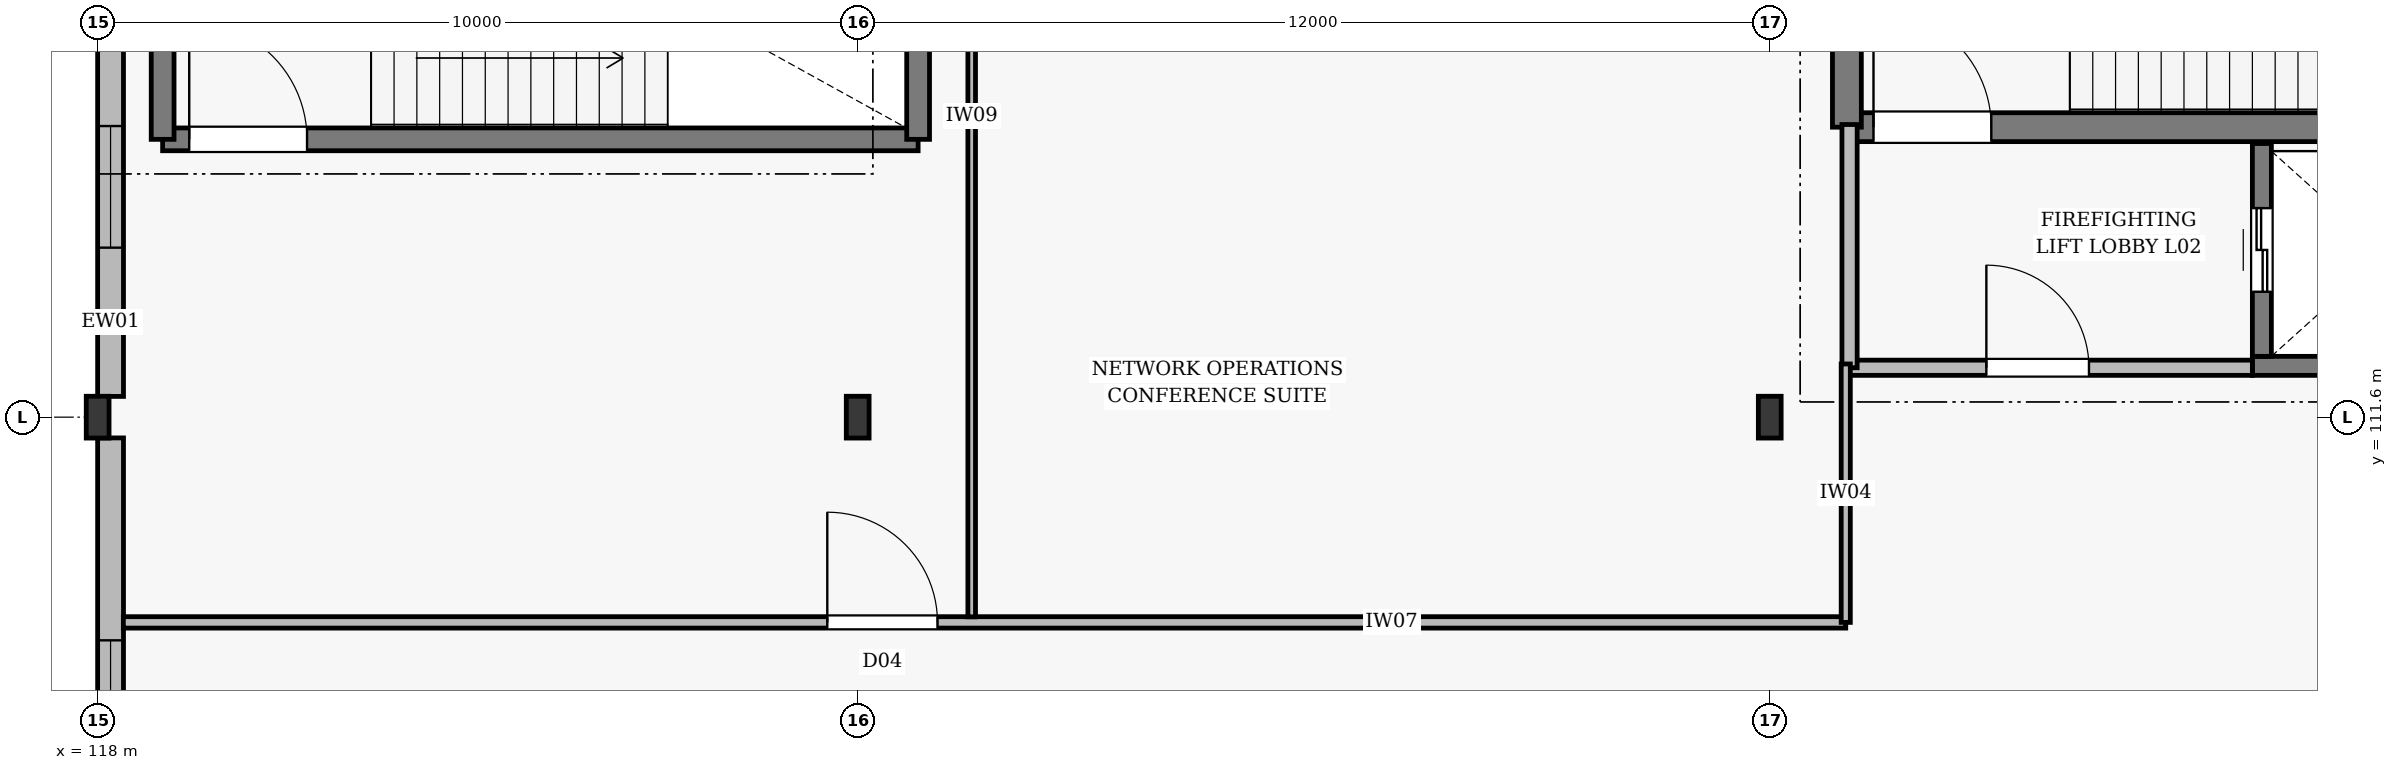
"""IFC4 building model, lengths in metres.
Left out: names, types, materials, properties, quantities, classifications, styles, units other than length and angle.
Written with IfcOpenShell. Run it as: python <this file> out.ifc"""

import sys

from ifc_helpers import new_model, si_unit, direction, frame, frame_2d, origin, origin_2d, place, context, subcontext, project, spatial, rectangle, i_section, extrude, element, fill, save


model = new_model("IFC4")
c1 = context("Model", 3, precision=1e-05, world=origin(), true_north=direction((0.0, 1.0)))
c2 = subcontext(c1, "Body", "Model", "MODEL_VIEW")
j1 = project(units=[si_unit("LENGTHUNIT", "METRE"), si_unit("PLANEANGLEUNIT", "RADIAN")], contexts=[c1])
p1 = place(None, origin())
s1 = spatial("IfcSite", under=j1, at=p1, CompositionType="ELEMENT")
p2 = place(p1, origin())
s2 = spatial("IfcBuilding", under=s1, at=p2, CompositionType="ELEMENT")
p3 = place(p2, frame((0.0, 0.0, 12.6)))
s3 = spatial("IfcBuildingStorey", under=s2, at=p3, CompositionType="ELEMENT", Elevation=12.6)
for number, where, z_axis, x_axis in (
    (1, (118.0, 111.6, 0.0), (0.0, 0.0, 1.0), (1.0, 0.0, 0.0)),
    (2, (128.0, 111.6, 0.0), (0.0, 0.0, 1.0), (1.0, 0.0, 0.0)),
    (3, (140.0, 111.6, 0.0), (0.0, 0.0, 1.0), (1.0, 0.0, 0.0)),
):
    element("IfcColumn", number, at=place(p3, frame(where, z_axis=z_axis, x_axis=x_axis)), inside=s3, PredefinedType="COLUMN", context=c2, shape_type="SweptSolid", body=[
        extrude(i_section(OverallWidth=0.3, OverallDepth=0.55, WebThickness=0.015, FlangeThickness=0.029, at=origin_2d()), origin(), (0.0, 0.0, 1.0), 4.8),
    ])
p4 = place(p3, frame((118.17, 101.073, 0.0), z_axis=(0.0, 0.0, 1.0), x_axis=(0.0, 1.0, 0.0)))
e4 = element("IfcWall", 4, at=p4, inside=s3, PredefinedType="STANDARD", context=c2, shape_type="SweptSolid", body=[
    extrude(rectangle(XDim=10.254, YDim=0.34, at=frame_2d((5.127, 0.0))), origin(), (0.0, 0.0, 1.0), 3.9),
])
p5 = place(p4, frame((0.964, 0.0, 0.75)))
e5 = element("IfcOpeningElement", 5, at=p5, cuts=e4, PredefinedType="OPENING", context=c2, shape_type="SweptSolid", body=[
    extrude(rectangle(XDim=1.2, YDim=1.8, at=frame_2d((0.6, 0.9))), frame((0.0, 0.182, 0.0), z_axis=(0.0, -1.0, 0.0), x_axis=(1.0, 0.0, 0.0)), (0.0, 0.0, 1.0), 0.364),
])
p6 = place(p4, frame((4.991, 0.0, 0.75)))
e6 = element("IfcOpeningElement", 6, at=p6, cuts=e4, PredefinedType="OPENING", context=c2, shape_type="SweptSolid", body=[
    extrude(rectangle(XDim=2.6, YDim=2.4, at=frame_2d((1.3, 1.2))), frame((0.0, 0.182, 0.0), z_axis=(0.0, -1.0, 0.0), x_axis=(1.0, 0.0, 0.0)), (0.0, 0.0, 1.0), 0.364),
])
p7 = place(p3, frame((118.17, 111.873, 0.0), z_axis=(0.0, 0.0, 1.0), x_axis=(0.0, 1.0, 0.0)))
e7 = element("IfcWall", 7, at=p7, inside=s3, PredefinedType="STANDARD", context=c2, shape_type="SweptSolid", body=[
    extrude(rectangle(XDim=10.229, YDim=0.34, at=frame_2d((5.115, 0.0))), origin(), (0.0, 0.0, 1.0), 3.9),
])
p8 = place(p7, frame((1.957, 0.0, 0.75)))
e8 = element("IfcOpeningElement", 8, at=p8, cuts=e7, PredefinedType="OPENING", context=c2, shape_type="SweptSolid", body=[
    extrude(rectangle(XDim=1.6, YDim=2.1, at=frame_2d((0.8, 1.05))), frame((0.0, 0.182, 0.0), z_axis=(0.0, -1.0, 0.0), x_axis=(1.0, 0.0, 0.0)), (0.0, 0.0, 1.0), 0.364),
])
p9 = place(p7, frame((6.672, 0.0, 0.75)))
e9 = element("IfcOpeningElement", 9, at=p9, cuts=e7, PredefinedType="OPENING", context=c2, shape_type="SweptSolid", body=[
    extrude(rectangle(XDim=1.6, YDim=2.1, at=frame_2d((0.8, 1.05))), frame((0.0, 0.182, 0.0), z_axis=(0.0, -1.0, 0.0), x_axis=(1.0, 0.0, 0.0)), (0.0, 0.0, 1.0), 0.364),
])
p10 = place(p3, frame((141.015, 115.415, 0.0), z_axis=(0.0, 0.0, 1.0), x_axis=(1.0, 0.0, 0.0)))
e10 = element("IfcWall", 10, at=p10, inside=s3, PredefinedType="SOLIDWALL", context=c2, shape_type="SweptSolid", body=[
    extrude(rectangle(XDim=10.17, YDim=0.38, at=frame_2d((5.085, 0.0))), origin(), (0.0, 0.0, 1.0), 4.8),
])
p11 = place(p10, frame((0.35, 0.0, 0.005)))
e11 = element("IfcOpeningElement", 11, at=p11, cuts=e10, PredefinedType="OPENING", context=c2, shape_type="SweptSolid", body=[
    extrude(rectangle(XDim=1.55, YDim=2.2, at=frame_2d((0.775, 1.1))), frame((0.0, 0.202, 0.0), z_axis=(0.0, -1.0, 0.0), x_axis=(1.0, 0.0, 0.0)), (0.0, 0.0, 1.0), 0.404),
])
p12 = place(p3, frame((141.015, 115.415, 0.0), z_axis=(0.0, 0.0, 1.0), x_axis=(0.0, 1.0, 0.0)))
e12 = element("IfcWall", 12, at=p12, inside=s3, PredefinedType="SOLIDWALL", context=c2, shape_type="SweptSolid", body=[
    extrude(rectangle(XDim=4.47, YDim=0.38, at=frame_2d((2.235, 0.0))), origin(), (0.0, 0.0, 1.0), 4.8),
])
p13 = place(p3, frame((118.855, 115.255, 0.0), z_axis=(0.0, 0.0, 1.0), x_axis=(1.0, 0.0, 0.0)))
e13 = element("IfcWall", 13, at=p13, inside=s3, PredefinedType="SOLIDWALL", context=c2, shape_type="SweptSolid", body=[
    extrude(rectangle(XDim=9.94, YDim=0.3, at=frame_2d((4.97, 0.0))), origin(), (0.0, 0.0, 1.0), 4.8),
])
p14 = place(p13, frame((0.35, 0.0, 0.005)))
e14 = element("IfcOpeningElement", 14, at=p14, cuts=e13, PredefinedType="OPENING", context=c2, shape_type="SweptSolid", body=[
    extrude(rectangle(XDim=1.55, YDim=2.2, at=frame_2d((0.775, 1.1))), frame((0.0, 0.162, 0.0), z_axis=(0.0, -1.0, 0.0), x_axis=(1.0, 0.0, 0.0)), (0.0, 0.0, 1.0), 0.324),
])
for number, where, z_axis, x_axis in (
    (15, (118.855, 115.255, 0.0), (0.0, 0.0, 1.0), (0.0, 1.0, 0.0)),
    (16, (128.795, 115.255, 0.0), (0.0, 0.0, 1.0), (0.0, 1.0, 0.0)),
):
    element("IfcWall", number, at=place(p3, frame(where, z_axis=z_axis, x_axis=x_axis)), inside=s3, PredefinedType="SOLIDWALL", context=c2, shape_type="SweptSolid", body=[
        extrude(rectangle(XDim=4.19, YDim=0.3, at=frame_2d((2.095, 0.0))), origin(), (0.0, 0.0, 1.0), 4.8),
    ])
p15 = place(p3, frame((146.35, 112.275, 0.0), z_axis=(0.0, 0.0, 1.0), x_axis=(1.0, 0.0, 0.0)))
e17 = element("IfcWall", 17, at=p15, inside=s3, PredefinedType="SOLIDWALL", context=c2, shape_type="SweptSolid", body=[
    extrude(rectangle(XDim=3.5, YDim=0.25, at=frame_2d((1.75, 0.0))), origin(), (0.0, 0.0, 1.0), 4.8),
])
p16 = place(p3, frame((146.475, 112.4, 0.0), z_axis=(0.0, 0.0, 1.0), x_axis=(0.0, 1.0, 0.0)))
e18 = element("IfcWall", 18, at=p16, inside=s3, PredefinedType="SOLIDWALL", context=c2, shape_type="SweptSolid", body=[
    extrude(rectangle(XDim=2.8, YDim=0.25, at=frame_2d((1.4, 0.0))), origin(), (0.0, 0.0, 1.0), 4.8),
])
p17 = place(p16, frame((0.85, 0.0, 0.005)))
e19 = element("IfcOpeningElement", 19, at=p17, cuts=e18, PredefinedType="OPENING", context=c2, shape_type="SweptSolid", body=[
    extrude(rectangle(XDim=1.1, YDim=2.15, at=frame_2d((0.55, 1.075))), frame((0.0, 0.137, 0.0), z_axis=(0.0, -1.0, 0.0), x_axis=(1.0, 0.0, 0.0)), (0.0, 0.0, 1.0), 0.274),
])
p18 = place(p3, frame((141.05, 112.25, 0.0), z_axis=(0.0, 0.0, 1.0), x_axis=(1.0, 0.0, 0.0)))
e20 = element("IfcWall", 20, at=p18, inside=s3, PredefinedType="PARTITIONING", context=c2, shape_type="SweptSolid", body=[
    extrude(rectangle(XDim=5.3, YDim=0.2, at=frame_2d((2.65, 0.0))), origin(), (0.0, 0.0, 1.0), 4.35),
])
p19 = place(p18, frame((1.8, 0.0, 0.005)))
e21 = element("IfcOpeningElement", 21, at=p19, cuts=e20, PredefinedType="OPENING", context=c2, shape_type="SweptSolid", body=[
    extrude(rectangle(XDim=1.35, YDim=2.15, at=frame_2d((0.675, 1.075))), frame((0.0, 0.112, 0.0), z_axis=(0.0, -1.0, 0.0), x_axis=(1.0, 0.0, 0.0)), (0.0, 0.0, 1.0), 0.224),
])
p20 = place(p3, frame((141.05, 112.25, 0.0), z_axis=(0.0, 0.0, 1.0), x_axis=(0.0, 1.0, 0.0)))
e22 = element("IfcWall", 22, at=p20, inside=s3, PredefinedType="PARTITIONING", context=c2, shape_type="SweptSolid", body=[
    extrude(rectangle(XDim=3.2, YDim=0.2, at=frame_2d((1.6, 0.0))), origin(), (0.0, 0.0, 1.0), 4.35),
])
p21 = place(p3, frame((118.338, 108.9, 0.0), z_axis=(0.0, 0.0, 1.0), x_axis=(1.0, 0.0, 0.0)))
e23 = element("IfcWall", 23, at=p21, inside=s3, PredefinedType="PARTITIONING", context=c2, shape_type="SweptSolid", body=[
    extrude(rectangle(XDim=22.662, YDim=0.15, at=frame_2d((11.331, 0.0))), origin(), (0.0, 0.0, 1.0), 4.09),
])
p22 = place(p21, frame((9.262, 0.0, 0.005)))
e24 = element("IfcOpeningElement", 24, at=p22, cuts=e23, PredefinedType="OPENING", context=c2, shape_type="SweptSolid", body=[
    extrude(rectangle(XDim=1.45, YDim=2.15, at=frame_2d((0.725, 1.075))), frame((0.0, 0.087, 0.0), z_axis=(0.0, -1.0, 0.0), x_axis=(1.0, 0.0, 0.0)), (0.0, 0.0, 1.0), 0.174),
])
p23 = place(p3, frame((141.0, 108.9, 0.0), z_axis=(0.0, 0.0, 1.0), x_axis=(0.0, 1.0, 0.0)))
e25 = element("IfcWall", 25, at=p23, inside=s3, PredefinedType="PARTITIONING", context=c2, shape_type="SweptSolid", body=[
    extrude(rectangle(XDim=3.4, YDim=0.12, at=frame_2d((1.7, 0.0))), origin(), (0.0, 0.0, 1.0), 3.99),
])
p24 = place(p3, frame((129.5, 108.973, 0.0), z_axis=(0.0, 0.0, 1.0), x_axis=(0.0, 1.0, 0.0)))
e26 = element("IfcWall", 26, at=p24, inside=s3, PredefinedType="MOVABLE", context=c2, shape_type="SweptSolid", body=[
    extrude(rectangle(XDim=13.189, YDim=0.1, at=frame_2d((6.595, 0.0))), origin(), (0.0, 0.0, 1.0), 4.09),
])
p25 = place(p6, origin())
e27 = element("IfcWindow", 27, at=p25, inside=s3, PartitioningType="DOUBLE_PANEL_VERTICAL", PredefinedType="WINDOW", context=c2, shape_type="SweptSolid", body=[
    extrude(rectangle(XDim=2.6, YDim=2.4, at=frame_2d((1.3, 1.2))), frame((0.0, 0.03, 0.0), z_axis=(0.0, -1.0, 0.0), x_axis=(1.0, 0.0, 0.0)), (0.0, 0.0, 1.0), 0.06),
])
fill(e6, e27)
p26 = place(p8, origin())
e28 = element("IfcWindow", 28, at=p26, inside=s3, PartitioningType="DOUBLE_PANEL_VERTICAL", PredefinedType="WINDOW", context=c2, shape_type="SweptSolid", body=[
    extrude(rectangle(XDim=1.6, YDim=2.1, at=frame_2d((0.8, 1.05))), frame((0.0, 0.03, 0.0), z_axis=(0.0, -1.0, 0.0), x_axis=(1.0, 0.0, 0.0)), (0.0, 0.0, 1.0), 0.06),
])
fill(e8, e28)
p27 = place(p11, origin())
e29 = element("IfcDoor", 29, at=p27, inside=s3, OperationType="SINGLE_SWING_LEFT", PredefinedType="DOOR", context=c2, shape_type="SweptSolid", body=[
    extrude(rectangle(XDim=1.55, YDim=2.2, at=frame_2d((0.775, 1.1))), frame((0.0, 0.025, 0.0), z_axis=(0.0, -1.0, 0.0), x_axis=(1.0, 0.0, 0.0)), (0.0, 0.0, 1.0), 0.05),
])
fill(e11, e29)
p28 = place(p14, origin())
e30 = element("IfcDoor", 30, at=p28, inside=s3, OperationType="SINGLE_SWING_LEFT", PredefinedType="DOOR", context=c2, shape_type="SweptSolid", body=[
    extrude(rectangle(XDim=1.55, YDim=2.2, at=frame_2d((0.775, 1.1))), frame((0.0, 0.025, 0.0), z_axis=(0.0, -1.0, 0.0), x_axis=(1.0, 0.0, 0.0)), (0.0, 0.0, 1.0), 0.05),
])
fill(e14, e30)
p29 = place(p17, origin())
e31 = element("IfcDoor", 31, at=p29, inside=s3, OperationType="SLIDING_TO_LEFT", PredefinedType="DOOR", context=c2, shape_type="SweptSolid", body=[
    extrude(rectangle(XDim=1.1, YDim=2.15, at=frame_2d((0.55, 1.075))), frame((0.0, 0.025, 0.0), z_axis=(0.0, -1.0, 0.0), x_axis=(1.0, 0.0, 0.0)), (0.0, 0.0, 1.0), 0.05),
])
fill(e19, e31)
p30 = place(p19, origin())
e32 = element("IfcDoor", 32, at=p30, inside=s3, OperationType="SINGLE_SWING_LEFT", PredefinedType="DOOR", context=c2, shape_type="SweptSolid", body=[
    extrude(rectangle(XDim=1.35, YDim=2.15, at=frame_2d((0.675, 1.075))), frame((0.0, 0.025, 0.0), z_axis=(0.0, -1.0, 0.0), x_axis=(1.0, 0.0, 0.0)), (0.0, 0.0, 1.0), 0.05),
])
fill(e21, e32)
p31 = place(p22, origin())
e33 = element("IfcDoor", 33, at=p31, inside=s3, OperationType="DOUBLE_DOOR_SINGLE_SWING", PredefinedType="DOOR", context=c2, shape_type="SweptSolid", body=[
    extrude(rectangle(XDim=1.45, YDim=2.15, at=frame_2d((0.725, 1.075))), frame((0.0, 0.025, 0.0), z_axis=(0.0, -1.0, 0.0), x_axis=(1.0, 0.0, 0.0)), (0.0, 0.0, 1.0), 0.05),
])
fill(e24, e33)
save(model, sys.argv[1])
